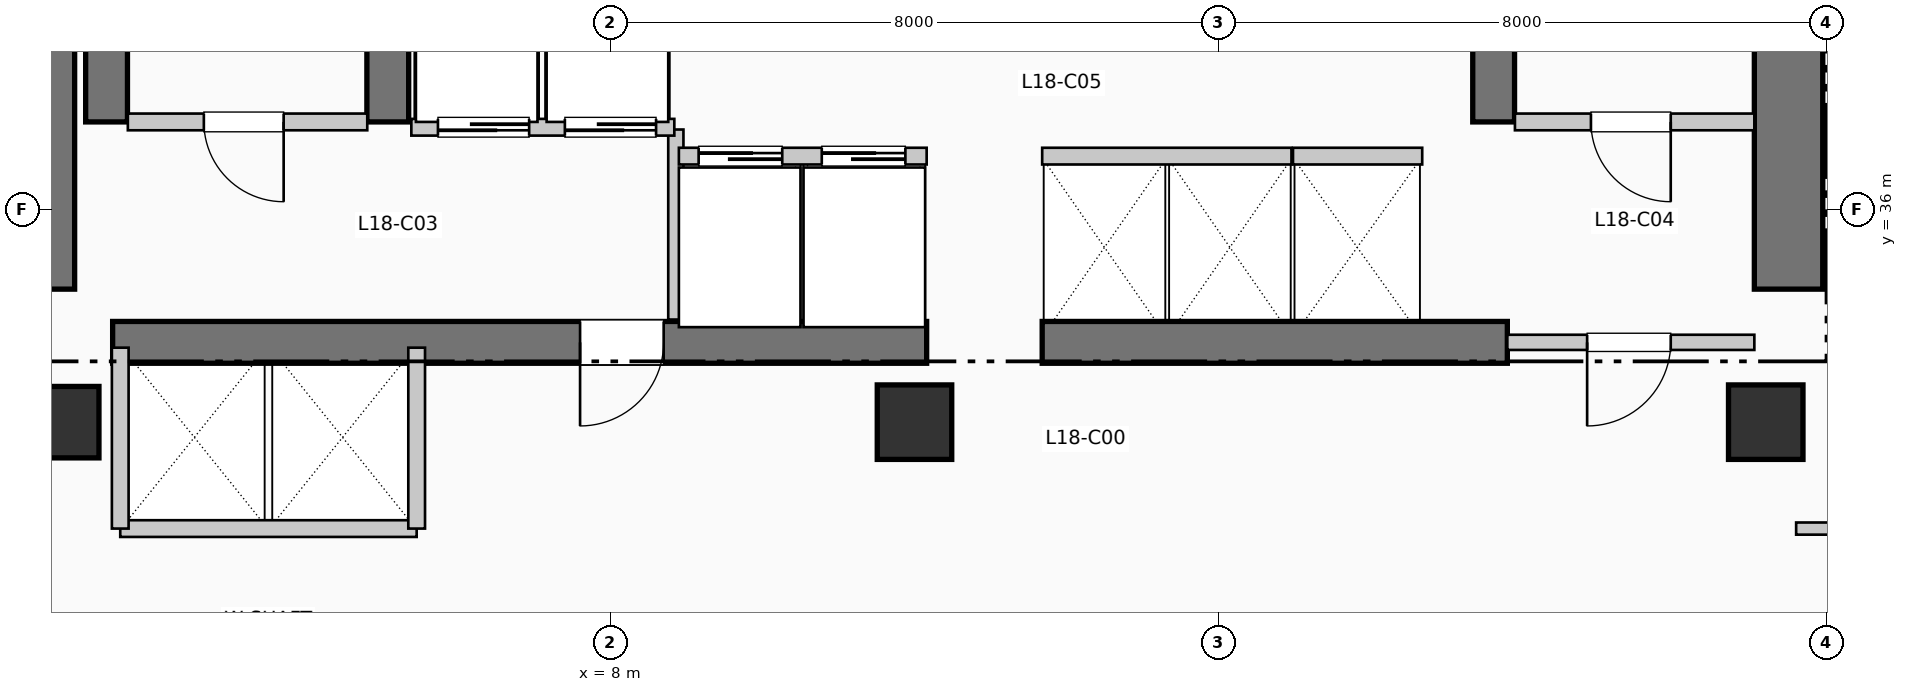
"""IFC4 building model, lengths in metres.
Left out: names, types, materials, properties, quantities, classifications, styles, units other than length and angle.
Written with IfcOpenShell. Run it as: python <this file> out.ifc"""

import sys

from ifc_helpers import new_model, si_unit, direction, frame, frame_2d, origin, origin_2d, place, context, subcontext, project, spatial, rectangle, extrude, element, fill, save


model = new_model("IFC4")
c1 = context("Model", 3, precision=1e-05, world=origin(), true_north=direction((0.0, 1.0)))
c2 = subcontext(c1, "Body", "Model", "MODEL_VIEW")
j1 = project(units=[si_unit("LENGTHUNIT", "METRE"), si_unit("PLANEANGLEUNIT", "RADIAN")], contexts=[c1])
p1 = place(None, origin())
s1 = spatial("IfcSite", under=j1, at=p1, CompositionType="ELEMENT")
p2 = place(p1, origin())
s2 = spatial("IfcBuilding", under=s1, at=p2, CompositionType="ELEMENT")
p3 = place(p2, frame((0.0, 0.0, 77.88)))
s3 = spatial("IfcBuildingStorey", under=s2, at=p3, CompositionType="ELEMENT", Elevation=77.88)
p4 = place(p3, frame((0.5, 34.95, 0.0), z_axis=(0.0, 0.0, 1.0), x_axis=(0.0, 1.0, 0.0)))
e1 = element("IfcWall", 1, at=p4, inside=s3, PredefinedType="SHEAR", context=c2, shape_type="SweptSolid", body=[
    extrude(rectangle(XDim=7.9, YDim=0.9, at=frame_2d((3.95, 0.0))), origin(), (0.0, 0.0, 1.0), 3.96),
])
p5 = place(p3, frame((23.5, 34.95, 0.0), z_axis=(0.0, 0.0, 1.0), x_axis=(0.0, 1.0, 0.0)))
e2 = element("IfcWall", 2, at=p5, inside=s3, PredefinedType="SHEAR", context=c2, shape_type="SweptSolid", body=[
    extrude(rectangle(XDim=10.64, YDim=0.9, at=frame_2d((5.32, 0.0))), origin(), (0.0, 0.0, 1.0), 3.96),
])
p6 = place(p3, frame((1.45, 34.25, 0.0), z_axis=(0.0, 0.0, 1.0), x_axis=(1.0, 0.0, 0.0)))
e3 = element("IfcWall", 3, at=p6, inside=s3, PredefinedType="SHEAR", context=c2, shape_type="SweptSolid", body=[
    extrude(rectangle(XDim=10.71, YDim=0.55, at=frame_2d((5.355, 0.0))), origin(), (0.0, 0.0, 1.0), 3.96),
])
p7 = place(p6, frame((7.25, 0.0, 0.0), z_axis=(0.0, 0.0, 1.0), x_axis=(-1.0, 0.0, 0.0)))
e4 = element("IfcOpeningElement", 4, at=p7, cuts=e3, PredefinedType="OPENING", context=c2, shape_type="SweptSolid", body=[
    extrude(rectangle(XDim=1.1, YDim=2.15, at=frame_2d((0.55, 1.075))), frame((0.0, 0.285, 0.0), z_axis=(0.0, -1.0, 0.0), x_axis=(1.0, 0.0, 0.0)), (0.0, 0.0, 1.0), 0.57),
])
p8 = place(p3, frame((13.68, 34.25, 0.0), z_axis=(0.0, 0.0, 1.0), x_axis=(1.0, 0.0, 0.0)))
e5 = element("IfcWall", 5, at=p8, inside=s3, PredefinedType="SHEAR", context=c2, shape_type="SweptSolid", body=[
    extrude(rectangle(XDim=6.12, YDim=0.55, at=frame_2d((3.06, 0.0))), origin(), (0.0, 0.0, 1.0), 3.96),
])
for number, where, z_axis, x_axis in (
    (6, (1.37, 37.15, 0.0), (0.0, 0.0, 1.0), (0.0, 1.0, 0.0)),
    (7, (5.07, 37.15, 0.0), (0.0, 0.0, 1.0), (0.0, 1.0, 0.0)),
    (8, (19.62, 37.15, 0.0), (0.0, 0.0, 1.0), (0.0, 1.0, 0.0)),
):
    element("IfcWall", number, at=place(p3, frame(where, z_axis=z_axis, x_axis=x_axis)), inside=s3, PredefinedType="SHEAR", context=c2, shape_type="SweptSolid", body=[
        extrude(rectangle(XDim=7.89, YDim=0.55, at=frame_2d((3.945, 0.0))), origin(), (0.0, 0.0, 1.0), 3.96),
    ])
p9 = place(p3, frame((0.8, 33.2, 0.0), z_axis=(0.0, 0.0, 1.0), x_axis=(1.0, 0.0, 0.0)))
e9 = element("IfcColumn", 9, at=p9, inside=s3, PredefinedType="COLUMN", context=c2, shape_type="SweptSolid", body=[
    extrude(rectangle(XDim=0.94, YDim=0.94, at=origin_2d()), origin(), (0.0, 0.0, 1.0), 3.96),
])
for number, where, z_axis, x_axis in (
    (10, (12.0, 33.2, 0.0), (0.0, 0.0, 1.0), (1.0, 0.0, 0.0)),
    (11, (23.2, 33.2, 0.0), (0.0, 0.0, 1.0), (1.0, 0.0, 0.0)),
):
    element("IfcColumn", number, at=place(p3, frame(where, z_axis=z_axis, x_axis=x_axis)), inside=s3, PredefinedType="COLUMN", context=c2, shape_type="SweptSolid", body=[
        extrude(rectangle(XDim=0.98, YDim=0.98, at=origin_2d()), origin(), (0.0, 0.0, 1.0), 3.96),
    ])
p10 = place(p3, frame((1.65, 37.15, 0.0), z_axis=(0.0, 0.0, 1.0), x_axis=(1.0, 0.0, 0.0)))
e12 = element("IfcWall", 12, at=p10, inside=s3, PredefinedType="PARTITIONING", context=c2, shape_type="SweptSolid", body=[
    extrude(rectangle(XDim=3.15, YDim=0.22, at=frame_2d((1.575, 0.0))), origin(), (0.0, 0.0, 1.0), 3.71),
])
p11 = place(p10, frame((2.05, 0.0, 0.0), z_axis=(0.0, 0.0, 1.0), x_axis=(-1.0, 0.0, 0.0)))
e13 = element("IfcOpeningElement", 13, at=p11, cuts=e12, PredefinedType="OPENING", context=c2, shape_type="SweptSolid", body=[
    extrude(rectangle(XDim=1.05, YDim=2.15, at=frame_2d((0.525, 1.075))), frame((0.0, 0.12, 0.0), z_axis=(0.0, -1.0, 0.0), x_axis=(1.0, 0.0, 0.0)), (0.0, 0.0, 1.0), 0.24),
])
p12 = place(p3, frame((8.86, 34.55, 0.0), z_axis=(0.0, 0.0, 1.0), x_axis=(0.0, 1.0, 0.0)))
e14 = element("IfcWall", 14, at=p12, inside=s3, PredefinedType="PARTITIONING", context=c2, shape_type="SweptSolid", body=[
    extrude(rectangle(XDim=2.5, YDim=0.2, at=frame_2d((1.25, 0.0))), origin(), (0.0, 0.0, 1.0), 3.71),
])
p13 = place(p3, frame((19.9, 37.15, 0.0), z_axis=(0.0, 0.0, 1.0), x_axis=(1.0, 0.0, 0.0)))
e15 = element("IfcWall", 15, at=p13, inside=s3, PredefinedType="PARTITIONING", context=c2, shape_type="SweptSolid", body=[
    extrude(rectangle(XDim=3.15, YDim=0.22, at=frame_2d((1.575, 0.0))), origin(), (0.0, 0.0, 1.0), 3.71),
])
p14 = place(p13, frame((2.05, 0.0, 0.0), z_axis=(0.0, 0.0, 1.0), x_axis=(-1.0, 0.0, 0.0)))
e16 = element("IfcOpeningElement", 16, at=p14, cuts=e15, PredefinedType="OPENING", context=c2, shape_type="SweptSolid", body=[
    extrude(rectangle(XDim=1.05, YDim=2.15, at=frame_2d((0.525, 1.075))), frame((0.0, 0.12, 0.0), z_axis=(0.0, -1.0, 0.0), x_axis=(1.0, 0.0, 0.0)), (0.0, 0.0, 1.0), 0.24),
])
p15 = place(p3, frame((19.8, 34.25, 0.0), z_axis=(0.0, 0.0, 1.0), x_axis=(1.0, 0.0, 0.0)))
e17 = element("IfcWall", 17, at=p15, inside=s3, PredefinedType="PARTITIONING", context=c2, shape_type="SweptSolid", body=[
    extrude(rectangle(XDim=3.25, YDim=0.2, at=frame_2d((1.625, 0.0))), origin(), (0.0, 0.0, 1.0), 3.71),
])
p16 = place(p15, frame((2.15, 0.0, 0.0), z_axis=(0.0, 0.0, 1.0), x_axis=(-1.0, 0.0, 0.0)))
e18 = element("IfcOpeningElement", 18, at=p16, cuts=e17, PredefinedType="OPENING", context=c2, shape_type="SweptSolid", body=[
    extrude(rectangle(XDim=1.1, YDim=2.15, at=frame_2d((0.55, 1.075))), frame((0.0, 0.11, 0.0), z_axis=(0.0, -1.0, 0.0), x_axis=(1.0, 0.0, 0.0)), (0.0, 0.0, 1.0), 0.22),
])
p17 = place(p3, frame((5.38, 37.08, 0.0), z_axis=(0.0, 0.0, 1.0), x_axis=(1.0, 0.0, 0.0)))
e19 = element("IfcWall", 19, at=p17, inside=s3, PredefinedType="PARTITIONING", context=c2, shape_type="SweptSolid", body=[
    extrude(rectangle(XDim=3.46, YDim=0.22, at=frame_2d((1.73, 0.0))), origin(), (0.0, 0.0, 1.0), 3.71),
])
p18 = place(p17, frame((1.55, 0.0, 0.0), z_axis=(0.0, 0.0, 1.0), x_axis=(-1.0, 0.0, 0.0)))
e20 = element("IfcOpeningElement", 20, at=p18, cuts=e19, PredefinedType="OPENING", context=c2, shape_type="SweptSolid", body=[
    extrude(rectangle(XDim=1.2, YDim=2.2, at=frame_2d((0.6, 1.1))), frame((0.0, 0.12, 0.0), z_axis=(0.0, -1.0, 0.0), x_axis=(1.0, 0.0, 0.0)), (0.0, 0.0, 1.0), 0.24),
])
p19 = place(p17, frame((3.22, 0.0, 0.0), z_axis=(0.0, 0.0, 1.0), x_axis=(-1.0, 0.0, 0.0)))
e21 = element("IfcOpeningElement", 21, at=p19, cuts=e19, PredefinedType="OPENING", context=c2, shape_type="SweptSolid", body=[
    extrude(rectangle(XDim=1.2, YDim=2.2, at=frame_2d((0.6, 1.1))), frame((0.0, 0.12, 0.0), z_axis=(0.0, -1.0, 0.0), x_axis=(1.0, 0.0, 0.0)), (0.0, 0.0, 1.0), 0.24),
])
p20 = place(p3, frame((1.55, 31.8, 0.0), z_axis=(0.0, 0.0, 1.0), x_axis=(1.0, 0.0, 0.0)))
e22 = element("IfcWall", 22, at=p20, inside=s3, PredefinedType="PARTITIONING", context=c2, shape_type="SweptSolid", body=[
    extrude(rectangle(XDim=3.9, YDim=0.22, at=frame_2d((1.95, 0.0))), origin(), (0.0, 0.0, 1.0), 3.71),
])
for number, where, z_axis, x_axis in (
    (23, (1.55, 31.8, 0.0), (0.0, 0.0, 1.0), (0.0, 1.0, 0.0)),
    (24, (5.45, 31.8, 0.0), (0.0, 0.0, 1.0), (0.0, 1.0, 0.0)),
):
    element("IfcWall", number, at=place(p3, frame(where, z_axis=z_axis, x_axis=x_axis)), inside=s3, PredefinedType="PARTITIONING", context=c2, shape_type="SweptSolid", body=[
        extrude(rectangle(XDim=2.38, YDim=0.22, at=frame_2d((1.19, 0.0))), origin(), (0.0, 0.0, 1.0), 3.71),
    ])
p21 = place(p3, frame((8.9, 36.7, 0.0), z_axis=(0.0, 0.0, 1.0), x_axis=(1.0, 0.0, 0.0)))
e25 = element("IfcWall", 25, at=p21, inside=s3, PredefinedType="PARTITIONING", context=c2, shape_type="SweptSolid", body=[
    extrude(rectangle(XDim=3.26, YDim=0.22, at=frame_2d((1.63, 0.0))), origin(), (0.0, 0.0, 1.0), 3.71),
])
p22 = place(p21, frame((0.26, 0.0, 0.0)))
e26 = element("IfcOpeningElement", 26, at=p22, cuts=e25, PredefinedType="OPENING", context=c2, shape_type="SweptSolid", body=[
    extrude(rectangle(XDim=1.1, YDim=2.2, at=frame_2d((0.55, 1.1))), frame((0.0, 0.12, 0.0), z_axis=(0.0, -1.0, 0.0), x_axis=(1.0, 0.0, 0.0)), (0.0, 0.0, 1.0), 0.24),
])
p23 = place(p21, frame((1.88, 0.0, 0.0)))
e27 = element("IfcOpeningElement", 27, at=p23, cuts=e25, PredefinedType="OPENING", context=c2, shape_type="SweptSolid", body=[
    extrude(rectangle(XDim=1.1, YDim=2.2, at=frame_2d((0.55, 1.1))), frame((0.0, 0.12, 0.0), z_axis=(0.0, -1.0, 0.0), x_axis=(1.0, 0.0, 0.0)), (0.0, 0.0, 1.0), 0.24),
])
p24 = place(p3, frame((13.68, 36.7, 0.0), z_axis=(0.0, 0.0, 1.0), x_axis=(1.0, 0.0, 0.0)))
e28 = element("IfcWall", 28, at=p24, inside=s3, PredefinedType="PARTITIONING", context=c2, shape_type="SweptSolid", body=[
    extrude(rectangle(XDim=3.28, YDim=0.22, at=frame_2d((1.64, 0.0))), origin(), (0.0, 0.0, 1.0), 3.71),
])
p25 = place(p3, frame((16.98, 36.7, 0.0), z_axis=(0.0, 0.0, 1.0), x_axis=(1.0, 0.0, 0.0)))
e29 = element("IfcWall", 29, at=p25, inside=s3, PredefinedType="PARTITIONING", context=c2, shape_type="SweptSolid", body=[
    extrude(rectangle(XDim=1.7, YDim=0.22, at=frame_2d((0.85, 0.0))), origin(), (0.0, 0.0, 1.0), 3.71),
])
p26 = place(p3, frame((23.6, 31.8, 0.0), z_axis=(0.0, 0.0, 1.0), x_axis=(1.0, 0.0, 0.0)))
e30 = element("IfcWall", 30, at=p26, inside=s3, PredefinedType="PARTITIONING", context=c2, shape_type="SweptSolid", body=[
    extrude(rectangle(XDim=32.21, YDim=0.16, at=frame_2d((16.105, 0.0))), origin(), (0.0, 0.0, 1.0), 3.71),
])
p27 = place(p26, frame((14.63, 0.0, 0.0)))
e31 = element("IfcOpeningElement", 31, at=p27, cuts=e30, PredefinedType="OPENING", context=c2, shape_type="SweptSolid", body=[
    extrude(rectangle(XDim=0.95, YDim=2.15, at=frame_2d((0.475, 1.075))), frame((0.0, 0.09, 0.0), z_axis=(0.0, -1.0, 0.0), x_axis=(1.0, 0.0, 0.0)), (0.0, 0.0, 1.0), 0.18),
])
p28 = place(p11, origin())
e32 = element("IfcDoor", 32, at=p28, inside=s3, OperationType="SINGLE_SWING_RIGHT", PredefinedType="DOOR", context=c2, shape_type="SweptSolid", body=[
    extrude(rectangle(XDim=1.05, YDim=2.15, at=frame_2d((0.525, 1.075))), frame((0.0, 0.025, 0.0), z_axis=(0.0, -1.0, 0.0), x_axis=(1.0, 0.0, 0.0)), (0.0, 0.0, 1.0), 0.05),
])
fill(e13, e32)
p29 = place(p7, origin())
e33 = element("IfcDoor", 33, at=p29, inside=s3, OperationType="SINGLE_SWING_LEFT", PredefinedType="DOOR", context=c2, shape_type="SweptSolid", body=[
    extrude(rectangle(XDim=1.1, YDim=2.15, at=frame_2d((0.55, 1.075))), frame((0.0, 0.025, 0.0), z_axis=(0.0, -1.0, 0.0), x_axis=(1.0, 0.0, 0.0)), (0.0, 0.0, 1.0), 0.05),
])
fill(e4, e33)
p30 = place(p14, origin())
e34 = element("IfcDoor", 34, at=p30, inside=s3, OperationType="SINGLE_SWING_RIGHT", PredefinedType="DOOR", context=c2, shape_type="SweptSolid", body=[
    extrude(rectangle(XDim=1.05, YDim=2.15, at=frame_2d((0.525, 1.075))), frame((0.0, 0.025, 0.0), z_axis=(0.0, -1.0, 0.0), x_axis=(1.0, 0.0, 0.0)), (0.0, 0.0, 1.0), 0.05),
])
fill(e16, e34)
p31 = place(p16, origin())
e35 = element("IfcDoor", 35, at=p31, inside=s3, OperationType="SINGLE_SWING_LEFT", PredefinedType="DOOR", context=c2, shape_type="SweptSolid", body=[
    extrude(rectangle(XDim=1.1, YDim=2.15, at=frame_2d((0.55, 1.075))), frame((0.0, 0.025, 0.0), z_axis=(0.0, -1.0, 0.0), x_axis=(1.0, 0.0, 0.0)), (0.0, 0.0, 1.0), 0.05),
])
fill(e18, e35)
p32 = place(p18, origin())
e36 = element("IfcDoor", 36, at=p32, inside=s3, OperationType="SLIDING_TO_RIGHT", PredefinedType="DOOR", context=c2, shape_type="SweptSolid", body=[
    extrude(rectangle(XDim=1.2, YDim=2.2, at=frame_2d((0.6, 1.1))), frame((0.0, 0.025, 0.0), z_axis=(0.0, -1.0, 0.0), x_axis=(1.0, 0.0, 0.0)), (0.0, 0.0, 1.0), 0.05),
])
fill(e20, e36)
p33 = place(p19, origin())
e37 = element("IfcDoor", 37, at=p33, inside=s3, OperationType="SLIDING_TO_RIGHT", PredefinedType="DOOR", context=c2, shape_type="SweptSolid", body=[
    extrude(rectangle(XDim=1.2, YDim=2.2, at=frame_2d((0.6, 1.1))), frame((0.0, 0.025, 0.0), z_axis=(0.0, -1.0, 0.0), x_axis=(1.0, 0.0, 0.0)), (0.0, 0.0, 1.0), 0.05),
])
fill(e21, e37)
p34 = place(p22, origin())
e38 = element("IfcDoor", 38, at=p34, inside=s3, OperationType="SLIDING_TO_LEFT", PredefinedType="DOOR", context=c2, shape_type="SweptSolid", body=[
    extrude(rectangle(XDim=1.1, YDim=2.2, at=frame_2d((0.55, 1.1))), frame((0.0, 0.025, 0.0), z_axis=(0.0, -1.0, 0.0), x_axis=(1.0, 0.0, 0.0)), (0.0, 0.0, 1.0), 0.05),
])
fill(e26, e38)
p35 = place(p23, origin())
e39 = element("IfcDoor", 39, at=p35, inside=s3, OperationType="SLIDING_TO_LEFT", PredefinedType="DOOR", context=c2, shape_type="SweptSolid", body=[
    extrude(rectangle(XDim=1.1, YDim=2.2, at=frame_2d((0.55, 1.1))), frame((0.0, 0.025, 0.0), z_axis=(0.0, -1.0, 0.0), x_axis=(1.0, 0.0, 0.0)), (0.0, 0.0, 1.0), 0.05),
])
fill(e27, e39)
save(model, sys.argv[1])
